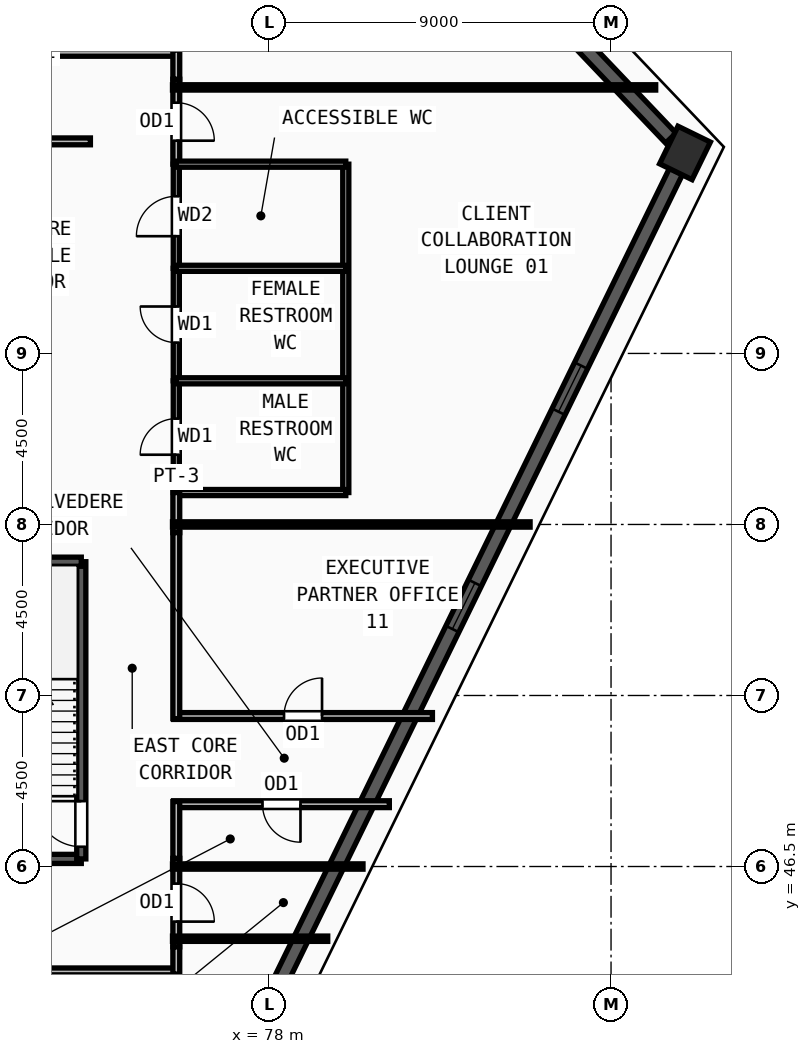
"""IFC4 building model, lengths in metres.
Left out: names, types, materials, properties, quantities, classifications, styles, units other than length and angle.
Written with IfcOpenShell. Run it as: python <this file> out.ifc"""

import sys

from ifc_helpers import new_model, si_unit, direction, frame, frame_2d, origin, origin_2d, place, context, subcontext, project, spatial, rectangle, extrude, source, transform, mapped, element, fill, save


model = new_model("IFC4")
c1 = context("Model", 3, precision=1e-05, world=origin(), true_north=direction((0.0, 1.0)))
c2 = subcontext(c1, "Body", "Model", "MODEL_VIEW")
j1 = project(units=[si_unit("LENGTHUNIT", "METRE"), si_unit("PLANEANGLEUNIT", "RADIAN")], contexts=[c1])
p1 = place(None, origin())
s1 = spatial("IfcSite", under=j1, at=p1, CompositionType="ELEMENT")
p2 = place(p1, origin())
s2 = spatial("IfcBuilding", under=s1, at=p2, CompositionType="ELEMENT")
p3 = place(p2, frame((0.0, 0.0, 339.75)))
s3 = spatial("IfcBuildingStorey", under=s2, at=p3, CompositionType="ELEMENT", Elevation=339.75)
m1 = source(origin(), c2, "Body", "SweptSolid", [
    extrude(rectangle(XDim=1.1, YDim=0.95, at=origin_2d()), origin(), (0.0, 0.0, 1.0), 3.75),
])
p4 = place(p3, frame((88.946, 65.276, 0.0), z_axis=(0.0, 0.0, 1.0), x_axis=(0.438998516526, 0.898487786499, 0.0)))
e1 = element("IfcColumn", 1, at=p4, inside=s3, PredefinedType="COLUMN", context=c2, shape_type="MappedRepresentation", body=[
    mapped(m1, transform((0.0, 0.0, 0.0), x_axis=(1.0, 0.0, 0.0), y_axis=(0.0, 1.0, 0.0), z_axis=(0.0, 0.0, 1.0), scale=1.0)),
])
p5 = place(p3, frame((77.534, 41.919, 0.0), z_axis=(0.0, 0.0, 1.0), x_axis=(0.438992867409, 0.898490546619, 0.0)))
e2 = element("IfcWall", 2, at=p5, inside=s3, PredefinedType="SOLIDWALL", context=c2, shape_type="SweptSolid", body=[
    extrude(rectangle(XDim=25.456, YDim=0.38, at=frame_2d((12.728, 0.0))), origin(), (0.0, 0.0, 1.0), 3.57),
])
m2 = source(origin(), c2, "Body", "SweptSolid", [
    extrude(rectangle(XDim=1.35, YDim=1.85, at=frame_2d((0.675, 0.925))), frame((0.0, 0.2, 0.0), z_axis=(0.0, -1.0, 0.0), x_axis=(1.0, 0.0, 0.0)), (0.0, 0.0, 1.0), 0.4),
])
p6 = place(p5, frame((12.053, 0.0, 0.55)))
e3 = element("IfcOpeningElement", 3, at=p6, cuts=e2, PredefinedType="OPENING", context=c2, shape_type="MappedRepresentation", body=[
    mapped(m2, transform((0.0, 0.0, 0.0), x_axis=(1.0, 0.0, 0.0), y_axis=(0.0, 1.0, 0.0), z_axis=(0.0, 0.0, 1.0), scale=1.0)),
])
p7 = place(p5, frame((18.417, 0.0, 0.55)))
e4 = element("IfcOpeningElement", 4, at=p7, cuts=e2, PredefinedType="OPENING", context=c2, shape_type="MappedRepresentation", body=[
    mapped(m2, transform((0.0, 0.0, 0.0), x_axis=(1.0, 0.0, 0.0), y_axis=(0.0, 1.0, 0.0), z_axis=(0.0, 0.0, 1.0), scale=1.0)),
])
p8 = place(p3, frame((88.574, 65.667, 0.0), z_axis=(0.0, 0.0, 1.0), x_axis=(-0.689475358223, 0.72430914008, 0.0)))
e5 = element("IfcWall", 5, at=p8, inside=s3, PredefinedType="SOLIDWALL", context=c2, shape_type="SweptSolid", body=[
    extrude(rectangle(XDim=3.764, YDim=0.38, at=frame_2d((1.882, 0.0))), origin(), (0.0, 0.0, 1.0), 3.57),
])
p9 = place(p3, frame((69.62, 46.7, 0.0), z_axis=(0.0, 0.0, 1.0), x_axis=(1.0, 0.0, 0.0)))
e6 = element("IfcWall", 6, at=p9, inside=s3, PredefinedType="SOLIDWALL", context=c2, shape_type="SweptSolid", body=[
    extrude(rectangle(XDim=3.44, YDim=0.24, at=frame_2d((1.72, 0.0))), origin(), (0.0, 0.0, 1.0), 3.57),
])
p10 = place(p3, frame((73.06, 46.7, 0.0), z_axis=(0.0, 0.0, 1.0), x_axis=(0.0, 1.0, 0.0)))
e7 = element("IfcWall", 7, at=p10, inside=s3, PredefinedType="SOLIDWALL", context=c2, shape_type="SweptSolid", body=[
    extrude(rectangle(XDim=7.82, YDim=0.24, at=frame_2d((3.91, 0.0))), origin(), (0.0, 0.0, 1.0), 3.57),
])
m3 = source(origin(), c2, "Body", "SweptSolid", [
    extrude(rectangle(XDim=1.2, YDim=2.2, at=frame_2d((0.6, 1.1))), frame((0.0, 0.13, 0.0), z_axis=(0.0, -1.0, 0.0), x_axis=(1.0, 0.0, 0.0)), (0.0, 0.0, 1.0), 0.26),
])
p11 = place(p10, frame((0.32, 0.0, 0.0)))
e8 = element("IfcOpeningElement", 8, at=p11, cuts=e7, PredefinedType="OPENING", context=c2, shape_type="MappedRepresentation", body=[
    mapped(m3, transform((0.0, 0.0, 0.0), x_axis=(1.0, 0.0, 0.0), y_axis=(0.0, 1.0, 0.0), z_axis=(0.0, 0.0, 1.0), scale=1.0)),
])
p12 = place(p3, frame((73.06, 54.52, 0.0), z_axis=(0.0, 0.0, 1.0), x_axis=(-1.0, 0.0, 0.0)))
e9 = element("IfcWall", 9, at=p12, inside=s3, PredefinedType="SOLIDWALL", context=c2, shape_type="SweptSolid", body=[
    extrude(rectangle(XDim=3.44, YDim=0.24, at=frame_2d((1.72, 0.0))), origin(), (0.0, 0.0, 1.0), 3.57),
])
p13 = place(p3, frame((75.56, 56.34, 0.0), z_axis=(0.0, 0.0, 1.0), x_axis=(0.0, 1.0, 0.0)))
e10 = element("IfcWall", 10, at=p13, inside=s3, PredefinedType="PARTITIONING", context=c2, shape_type="SweptSolid", body=[
    extrude(rectangle(XDim=2.94, YDim=0.16, at=frame_2d((1.47, 0.0))), origin(), (0.0, 0.0, 1.0), 3.57),
])
m4 = source(origin(), c2, "Body", "SweptSolid", [
    extrude(rectangle(XDim=0.95, YDim=2.15, at=frame_2d((0.475, 1.075))), frame((0.0, 0.09, 0.0), z_axis=(0.0, -1.0, 0.0), x_axis=(1.0, 0.0, 0.0)), (0.0, 0.0, 1.0), 0.18),
])
p14 = place(p13, frame((0.995, 0.0, 0.0)))
e11 = element("IfcOpeningElement", 11, at=p14, cuts=e10, PredefinedType="OPENING", context=c2, shape_type="MappedRepresentation", body=[
    mapped(m4, transform((0.0, 0.0, 0.0), x_axis=(1.0, 0.0, 0.0), y_axis=(0.0, 1.0, 0.0), z_axis=(0.0, 0.0, 1.0), scale=1.0)),
])
p15 = place(p3, frame((75.56, 59.28, 0.0), z_axis=(0.0, 0.0, 1.0), x_axis=(0.0, 1.0, 0.0)))
e12 = element("IfcWall", 12, at=p15, inside=s3, PredefinedType="PARTITIONING", context=c2, shape_type="SweptSolid", body=[
    extrude(rectangle(XDim=2.96, YDim=0.16, at=frame_2d((1.48, 0.0))), origin(), (0.0, 0.0, 1.0), 3.57),
])
p16 = place(p15, frame((1.005, 0.0, 0.0)))
e13 = element("IfcOpeningElement", 13, at=p16, cuts=e12, PredefinedType="OPENING", context=c2, shape_type="MappedRepresentation", body=[
    mapped(m4, transform((0.0, 0.0, 0.0), x_axis=(1.0, 0.0, 0.0), y_axis=(0.0, 1.0, 0.0), z_axis=(0.0, 0.0, 1.0), scale=1.0)),
])
p17 = place(p3, frame((75.56, 62.24, 0.0), z_axis=(0.0, 0.0, 1.0), x_axis=(0.0, 1.0, 0.0)))
e14 = element("IfcWall", 14, at=p17, inside=s3, PredefinedType="PARTITIONING", context=c2, shape_type="SweptSolid", body=[
    extrude(rectangle(XDim=2.74, YDim=0.16, at=frame_2d((1.37, 0.0))), origin(), (0.0, 0.0, 1.0), 3.57),
])
m5 = source(origin(), c2, "Body", "SweptSolid", [
    extrude(rectangle(XDim=1.05, YDim=2.15, at=frame_2d((0.525, 1.075))), frame((0.0, 0.09, 0.0), z_axis=(0.0, -1.0, 0.0), x_axis=(1.0, 0.0, 0.0)), (0.0, 0.0, 1.0), 0.18),
])
p18 = place(p17, frame((0.845, 0.0, 0.0)))
e15 = element("IfcOpeningElement", 15, at=p18, cuts=e14, PredefinedType="OPENING", context=c2, shape_type="MappedRepresentation", body=[
    mapped(m5, transform((0.0, 0.0, 0.0), x_axis=(1.0, 0.0, 0.0), y_axis=(0.0, 1.0, 0.0), z_axis=(0.0, 0.0, 1.0), scale=1.0)),
])
p19 = place(p3, frame((69.46, 65.58, 0.0), z_axis=(0.0, 0.0, 1.0), x_axis=(1.0, 0.0, 0.0)))
e16 = element("IfcWall", 16, at=p19, inside=s3, PredefinedType="PARTITIONING", context=c2, shape_type="SweptSolid", body=[
    extrude(rectangle(XDim=3.84, YDim=0.18, at=frame_2d((1.92, 0.0))), origin(), (0.0, 0.0, 1.0), 3.57),
])
m6 = source(origin(), c2, "Body", "SweptSolid", [
    extrude(rectangle(XDim=1.3, YDim=2.2, at=frame_2d((0.65, 1.1))), frame((0.0, 0.1, 0.0), z_axis=(0.0, -1.0, 0.0), x_axis=(1.0, 0.0, 0.0)), (0.0, 0.0, 1.0), 0.2),
])
p20 = place(p19, frame((1.27, 0.0, 0.0)))
e17 = element("IfcOpeningElement", 17, at=p20, cuts=e16, PredefinedType="OPENING", context=c2, shape_type="MappedRepresentation", body=[
    mapped(m6, transform((0.0, 0.0, 0.0), x_axis=(1.0, 0.0, 0.0), y_axis=(0.0, 1.0, 0.0), z_axis=(0.0, 0.0, 1.0), scale=1.0)),
])
p21 = place(p3, frame((75.56, 67.215, 0.0), z_axis=(0.0, 0.0, 1.0), x_axis=(0.0, -1.0, 0.0)))
e18 = element("IfcWall", 18, at=p21, inside=s3, PredefinedType="PARTITIONING", context=c2, shape_type="SweptSolid", body=[
    extrude(rectangle(XDim=2.235, YDim=0.18, at=frame_2d((1.118, 0.0))), origin(), (0.0, 0.0, 1.0), 3.57),
])
m7 = source(origin(), c2, "Body", "SweptSolid", [
    extrude(rectangle(XDim=1.0, YDim=2.2, at=frame_2d((0.5, 1.1))), frame((0.0, 0.1, 0.0), z_axis=(0.0, -1.0, 0.0), x_axis=(1.0, 0.0, 0.0)), (0.0, 0.0, 1.0), 0.2),
])
p22 = place(p21, frame((0.617, 0.0, 0.0)))
e19 = element("IfcOpeningElement", 19, at=p22, cuts=e18, PredefinedType="OPENING", context=c2, shape_type="MappedRepresentation", body=[
    mapped(m7, transform((0.0, 0.0, 0.0), x_axis=(1.0, 0.0, 0.0), y_axis=(0.0, 1.0, 0.0), z_axis=(0.0, 0.0, 1.0), scale=1.0)),
])
p23 = place(p3, frame((58.285, 67.91, 0.0), z_axis=(0.0, 0.0, 1.0), x_axis=(1.0, 0.0, 0.0)))
e20 = element("IfcWall", 20, at=p23, inside=s3, PredefinedType="PARTITIONING", context=c2, shape_type="SweptSolid", body=[
    extrude(rectangle(XDim=17.345, YDim=0.18, at=frame_2d((8.672, 0.0))), origin(), (0.0, 0.0, 1.0), 3.57),
])
m8 = source(origin(), c2, "Body", "SweptSolid", [
    extrude(rectangle(XDim=1.5, YDim=2.2, at=frame_2d((0.75, 1.1))), frame((0.0, 0.1, 0.0), z_axis=(0.0, -1.0, 0.0), x_axis=(1.0, 0.0, 0.0)), (0.0, 0.0, 1.0), 0.2),
])
p24 = place(p23, frame((7.922, 0.0, 0.0)))
e21 = element("IfcOpeningElement", 21, at=p24, cuts=e20, PredefinedType="OPENING", context=c2, shape_type="MappedRepresentation", body=[
    mapped(m8, transform((0.0, 0.0, 0.0), x_axis=(1.0, 0.0, 0.0), y_axis=(0.0, 1.0, 0.0), z_axis=(0.0, 0.0, 1.0), scale=1.0)),
])
p25 = place(p3, frame((75.63, 43.74, 0.0), z_axis=(0.0, 0.0, 1.0), x_axis=(-1.0, 0.0, 0.0)))
e22 = element("IfcWall", 22, at=p25, inside=s3, PredefinedType="PARTITIONING", context=c2, shape_type="SweptSolid", body=[
    extrude(rectangle(XDim=20.915, YDim=0.18, at=frame_2d((10.458, 0.0))), origin(), (0.0, 0.0, 1.0), 3.57),
])
p26 = place(p25, frame((9.707, 0.0, 0.0)))
e23 = element("IfcOpeningElement", 23, at=p26, cuts=e22, PredefinedType="OPENING", context=c2, shape_type="MappedRepresentation", body=[
    mapped(m8, transform((0.0, 0.0, 0.0), x_axis=(1.0, 0.0, 0.0), y_axis=(0.0, 1.0, 0.0), z_axis=(0.0, 0.0, 1.0), scale=1.0)),
])
p27 = place(p3, frame((75.56, 46.715, 0.0), z_axis=(0.0, 0.0, 1.0), x_axis=(0.0, -1.0, 0.0)))
e24 = element("IfcWall", 24, at=p27, inside=s3, PredefinedType="PARTITIONING", context=c2, shape_type="SweptSolid", body=[
    extrude(rectangle(XDim=2.33, YDim=0.18, at=frame_2d((1.165, 0.0))), origin(), (0.0, 0.0, 1.0), 3.57),
])
p28 = place(p27, frame((0.665, 0.0, 0.0)))
e25 = element("IfcOpeningElement", 25, at=p28, cuts=e24, PredefinedType="OPENING", context=c2, shape_type="MappedRepresentation", body=[
    mapped(m7, transform((0.0, 0.0, 0.0), x_axis=(1.0, 0.0, 0.0), y_axis=(0.0, 1.0, 0.0), z_axis=(0.0, 0.0, 1.0), scale=1.0)),
])
p29 = place(p3, frame((81.166, 48.14, 0.0), z_axis=(0.0, 0.0, 1.0), x_axis=(-1.0, 0.0, 0.0)))
e26 = element("IfcWall", 26, at=p29, inside=s3, PredefinedType="PARTITIONING", context=c2, shape_type="SweptSolid", body=[
    extrude(rectangle(XDim=5.676, YDim=0.18, at=frame_2d((2.838, 0.0))), origin(), (0.0, 0.0, 1.0), 3.57),
])
p30 = place(p29, frame((2.338, 0.0, 0.0)))
e27 = element("IfcOpeningElement", 27, at=p30, cuts=e26, PredefinedType="OPENING", context=c2, shape_type="MappedRepresentation", body=[
    mapped(m7, transform((0.0, 0.0, 0.0), x_axis=(1.0, 0.0, 0.0), y_axis=(0.0, 1.0, 0.0), z_axis=(0.0, 0.0, 1.0), scale=1.0)),
])
p31 = place(p3, frame((75.49, 50.46, 0.0), z_axis=(0.0, 0.0, 1.0), x_axis=(1.0, 0.0, 0.0)))
e28 = element("IfcWall", 28, at=p31, inside=s3, PredefinedType="PARTITIONING", context=c2, shape_type="SweptSolid", body=[
    extrude(rectangle(XDim=6.81, YDim=0.18, at=frame_2d((3.405, 0.0))), origin(), (0.0, 0.0, 1.0), 3.57),
])
p32 = place(p31, frame((2.905, 0.0, 0.0)))
e29 = element("IfcOpeningElement", 29, at=p32, cuts=e28, PredefinedType="OPENING", context=c2, shape_type="MappedRepresentation", body=[
    mapped(m7, transform((0.0, 0.0, 0.0), x_axis=(1.0, 0.0, 0.0), y_axis=(0.0, 1.0, 0.0), z_axis=(0.0, 0.0, 1.0), scale=1.0)),
])
p33 = place(p3, frame((80.02, 56.34, 0.0), z_axis=(0.0, 0.0, 1.0), x_axis=(0.0, 1.0, 0.0)))
e30 = element("IfcWall", 30, at=p33, inside=s3, PredefinedType="PARTITIONING", context=c2, shape_type="SweptSolid", body=[
    extrude(rectangle(XDim=8.64, YDim=0.16, at=frame_2d((4.32, 0.0))), origin(), (0.0, 0.0, 1.0), 3.57),
])
for number, where, z_axis, x_axis in (
    (31, (75.56, 56.34, 0.0), (0.0, 0.0, 1.0), (1.0, 0.0, 0.0)),
    (32, (75.56, 59.28, 0.0), (0.0, 0.0, 1.0), (1.0, 0.0, 0.0)),
    (33, (75.56, 62.24, 0.0), (0.0, 0.0, 1.0), (1.0, 0.0, 0.0)),
    (34, (75.56, 64.98, 0.0), (0.0, 0.0, 1.0), (1.0, 0.0, 0.0)),
):
    element("IfcWall", number, at=place(p3, frame(where, z_axis=z_axis, x_axis=x_axis)), inside=s3, PredefinedType="PARTITIONING", context=c2, shape_type="SweptSolid", body=[
        extrude(rectangle(XDim=4.46, YDim=0.16, at=frame_2d((2.23, 0.0))), origin(), (0.0, 0.0, 1.0), 3.57),
    ])
p34 = place(p3, frame((75.56, 56.34, 0.0), z_axis=(0.0, 0.0, 1.0), x_axis=(0.0, -1.0, 0.0)))
e35 = element("IfcWall", 35, at=p34, inside=s3, PredefinedType="PARTITIONING", context=c2, shape_type="SweptSolid", body=[
    extrude(rectangle(XDim=1.055, YDim=0.18, at=frame_2d((0.528, 0.0))), origin(), (0.0, 0.0, 1.0), 3.57),
])
p35 = place(p3, frame((75.56, 67.98, 0.0), z_axis=(0.0, 0.0, 1.0), x_axis=(0.0, -1.0, 0.0)))
e36 = element("IfcWall", 36, at=p35, inside=s3, PredefinedType="PARTITIONING", context=c2, shape_type="SweptSolid", body=[
    extrude(rectangle(XDim=0.765, YDim=0.18, at=frame_2d((0.382, 0.0))), origin(), (0.0, 0.0, 1.0), 3.57),
])
p36 = place(p3, frame((75.56, 44.385, 0.0), z_axis=(0.0, 0.0, 1.0), x_axis=(0.0, -1.0, 0.0)))
e37 = element("IfcWall", 37, at=p36, inside=s3, PredefinedType="PARTITIONING", context=c2, shape_type="SweptSolid", body=[
    extrude(rectangle(XDim=0.715, YDim=0.18, at=frame_2d((0.357, 0.0))), origin(), (0.0, 0.0, 1.0), 3.57),
])
p37 = place(p3, frame((75.56, 48.21, 0.0), z_axis=(0.0, 0.0, 1.0), x_axis=(0.0, -1.0, 0.0)))
e38 = element("IfcWall", 38, at=p37, inside=s3, PredefinedType="PARTITIONING", context=c2, shape_type="SweptSolid", body=[
    extrude(rectangle(XDim=1.495, YDim=0.18, at=frame_2d((0.748, 0.0))), origin(), (0.0, 0.0, 1.0), 3.57),
])
p38 = place(p3, frame((75.56, 55.285, 0.0), z_axis=(0.0, 0.0, 1.0), x_axis=(0.0, -1.0, 0.0)))
e39 = element("IfcWall", 39, at=p38, inside=s3, PredefinedType="PARTITIONING", context=c2, shape_type="SweptSolid", body=[
    extrude(rectangle(XDim=4.895, YDim=0.18, at=frame_2d((2.448, 0.0))), origin(), (0.0, 0.0, 1.0), 3.57),
])
p39 = place(p3, frame((75.46, 44.6, 0.0), z_axis=(0.0, 0.0, 1.0), x_axis=(1.0, 0.0, 0.0)))
e40 = element("IfcWall", 40, at=p39, inside=s3, PredefinedType="PARTITIONING", context=c2, shape_type="SweptSolid", body=[
    extrude(rectangle(XDim=4.085, YDim=0.14, at=frame_2d((2.042, 0.0))), origin(), (0.0, 0.0, 1.0), 3.57),
])
p40 = place(p3, frame((75.46, 46.5, 0.0), z_axis=(0.0, 0.0, 1.0), x_axis=(1.0, 0.0, 0.0)))
e41 = element("IfcWall", 41, at=p40, inside=s3, PredefinedType="PARTITIONING", context=c2, shape_type="SweptSolid", body=[
    extrude(rectangle(XDim=5.013, YDim=0.14, at=frame_2d((2.506, 0.0))), origin(), (0.0, 0.0, 1.0), 3.57),
])
p41 = place(p3, frame((75.46, 55.5, 0.0), z_axis=(0.0, 0.0, 1.0), x_axis=(1.0, 0.0, 0.0)))
e42 = element("IfcWall", 42, at=p41, inside=s3, PredefinedType="PARTITIONING", context=c2, shape_type="SweptSolid", body=[
    extrude(rectangle(XDim=9.41, YDim=0.14, at=frame_2d((4.705, 0.0))), origin(), (0.0, 0.0, 1.0), 3.57),
])
p42 = place(p3, frame((75.46, 67.0, 0.0), z_axis=(0.0, 0.0, 1.0), x_axis=(1.0, 0.0, 0.0)))
e43 = element("IfcWall", 43, at=p42, inside=s3, PredefinedType="PARTITIONING", context=c2, shape_type="SweptSolid", body=[
    extrude(rectangle(XDim=12.715, YDim=0.14, at=frame_2d((6.357, 0.0))), origin(), (0.0, 0.0, 1.0), 3.57),
])
m9 = source(origin(), c2, "Body", "SweptSolid", [
    extrude(rectangle(XDim=1.35, YDim=1.85, at=frame_2d((0.675, 0.925))), frame((0.0, 0.03, 0.0), z_axis=(0.0, -1.0, 0.0), x_axis=(1.0, 0.0, 0.0)), (0.0, 0.0, 1.0), 0.06),
])
p43 = place(p6, origin())
e44 = element("IfcWindow", 44, at=p43, inside=s3, PartitioningType="SINGLE_PANEL", PredefinedType="WINDOW", context=c2, shape_type="MappedRepresentation", body=[
    mapped(m9, transform((0.0, 0.0, 0.0), x_axis=(1.0, 0.0, 0.0), y_axis=(0.0, 1.0, 0.0), z_axis=(0.0, 0.0, 1.0), scale=1.0)),
])
fill(e3, e44)
p44 = place(p7, origin())
e45 = element("IfcWindow", 45, at=p44, inside=s3, PartitioningType="SINGLE_PANEL", PredefinedType="WINDOW", context=c2, shape_type="MappedRepresentation", body=[
    mapped(m9, transform((0.0, 0.0, 0.0), x_axis=(1.0, 0.0, 0.0), y_axis=(0.0, 1.0, 0.0), z_axis=(0.0, 0.0, 1.0), scale=1.0)),
])
fill(e4, e45)
m10 = source(origin(), c2, "Body", "SweptSolid", [
    extrude(rectangle(XDim=1.2, YDim=2.2, at=frame_2d((0.6, 1.1))), frame((0.0, 0.025, 0.0), z_axis=(0.0, -1.0, 0.0), x_axis=(1.0, 0.0, 0.0)), (0.0, 0.0, 1.0), 0.05),
])
p45 = place(p11, origin())
e46 = element("IfcDoor", 46, at=p45, inside=s3, OperationType="SINGLE_SWING_RIGHT", PredefinedType="DOOR", context=c2, shape_type="MappedRepresentation", body=[
    mapped(m10, transform((0.0, 0.0, 0.0), x_axis=(1.0, 0.0, 0.0), y_axis=(0.0, 1.0, 0.0), z_axis=(0.0, 0.0, 1.0), scale=1.0)),
])
fill(e8, e46)
m11 = source(origin(), c2, "Body", "SweptSolid", [
    extrude(rectangle(XDim=0.95, YDim=2.15, at=frame_2d((0.475, 1.075))), frame((0.0, 0.025, 0.0), z_axis=(0.0, -1.0, 0.0), x_axis=(1.0, 0.0, 0.0)), (0.0, 0.0, 1.0), 0.05),
])
p46 = place(p14, origin())
e47 = element("IfcDoor", 47, at=p46, inside=s3, OperationType="SINGLE_SWING_LEFT", PredefinedType="DOOR", context=c2, shape_type="MappedRepresentation", body=[
    mapped(m11, transform((0.0, 0.0, 0.0), x_axis=(1.0, 0.0, 0.0), y_axis=(0.0, 1.0, 0.0), z_axis=(0.0, 0.0, 1.0), scale=1.0)),
])
fill(e11, e47)
p47 = place(p16, origin())
e48 = element("IfcDoor", 48, at=p47, inside=s3, OperationType="SINGLE_SWING_RIGHT", PredefinedType="DOOR", context=c2, shape_type="MappedRepresentation", body=[
    mapped(m11, transform((0.0, 0.0, 0.0), x_axis=(1.0, 0.0, 0.0), y_axis=(0.0, 1.0, 0.0), z_axis=(0.0, 0.0, 1.0), scale=1.0)),
])
fill(e13, e48)
m12 = source(origin(), c2, "Body", "SweptSolid", [
    extrude(rectangle(XDim=1.05, YDim=2.15, at=frame_2d((0.525, 1.075))), frame((0.0, 0.025, 0.0), z_axis=(0.0, -1.0, 0.0), x_axis=(1.0, 0.0, 0.0)), (0.0, 0.0, 1.0), 0.05),
])
p48 = place(p18, origin())
e49 = element("IfcDoor", 49, at=p48, inside=s3, OperationType="SINGLE_SWING_LEFT", PredefinedType="DOOR", context=c2, shape_type="MappedRepresentation", body=[
    mapped(m12, transform((0.0, 0.0, 0.0), x_axis=(1.0, 0.0, 0.0), y_axis=(0.0, 1.0, 0.0), z_axis=(0.0, 0.0, 1.0), scale=1.0)),
])
fill(e15, e49)
m13 = source(origin(), c2, "Body", "SweptSolid", [
    extrude(rectangle(XDim=1.0, YDim=2.2, at=frame_2d((0.5, 1.1))), frame((0.0, 0.025, 0.0), z_axis=(0.0, -1.0, 0.0), x_axis=(1.0, 0.0, 0.0)), (0.0, 0.0, 1.0), 0.05),
])
p49 = place(p22, origin())
e50 = element("IfcDoor", 50, at=p49, inside=s3, OperationType="SINGLE_SWING_RIGHT", PredefinedType="DOOR", context=c2, shape_type="MappedRepresentation", body=[
    mapped(m13, transform((0.0, 0.0, 0.0), x_axis=(1.0, 0.0, 0.0), y_axis=(0.0, 1.0, 0.0), z_axis=(0.0, 0.0, 1.0), scale=1.0)),
])
fill(e19, e50)
p50 = place(p28, origin())
e51 = element("IfcDoor", 51, at=p50, inside=s3, OperationType="SINGLE_SWING_RIGHT", PredefinedType="DOOR", context=c2, shape_type="MappedRepresentation", body=[
    mapped(m13, transform((0.0, 0.0, 0.0), x_axis=(1.0, 0.0, 0.0), y_axis=(0.0, 1.0, 0.0), z_axis=(0.0, 0.0, 1.0), scale=1.0)),
])
fill(e25, e51)
p51 = place(p30, origin())
e52 = element("IfcDoor", 52, at=p51, inside=s3, OperationType="SINGLE_SWING_LEFT", PredefinedType="DOOR", context=c2, shape_type="MappedRepresentation", body=[
    mapped(m13, transform((0.0, 0.0, 0.0), x_axis=(1.0, 0.0, 0.0), y_axis=(0.0, 1.0, 0.0), z_axis=(0.0, 0.0, 1.0), scale=1.0)),
])
fill(e27, e52)
p52 = place(p32, origin())
e53 = element("IfcDoor", 53, at=p52, inside=s3, OperationType="SINGLE_SWING_RIGHT", PredefinedType="DOOR", context=c2, shape_type="MappedRepresentation", body=[
    mapped(m13, transform((0.0, 0.0, 0.0), x_axis=(1.0, 0.0, 0.0), y_axis=(0.0, 1.0, 0.0), z_axis=(0.0, 0.0, 1.0), scale=1.0)),
])
fill(e29, e53)
save(model, sys.argv[1])
